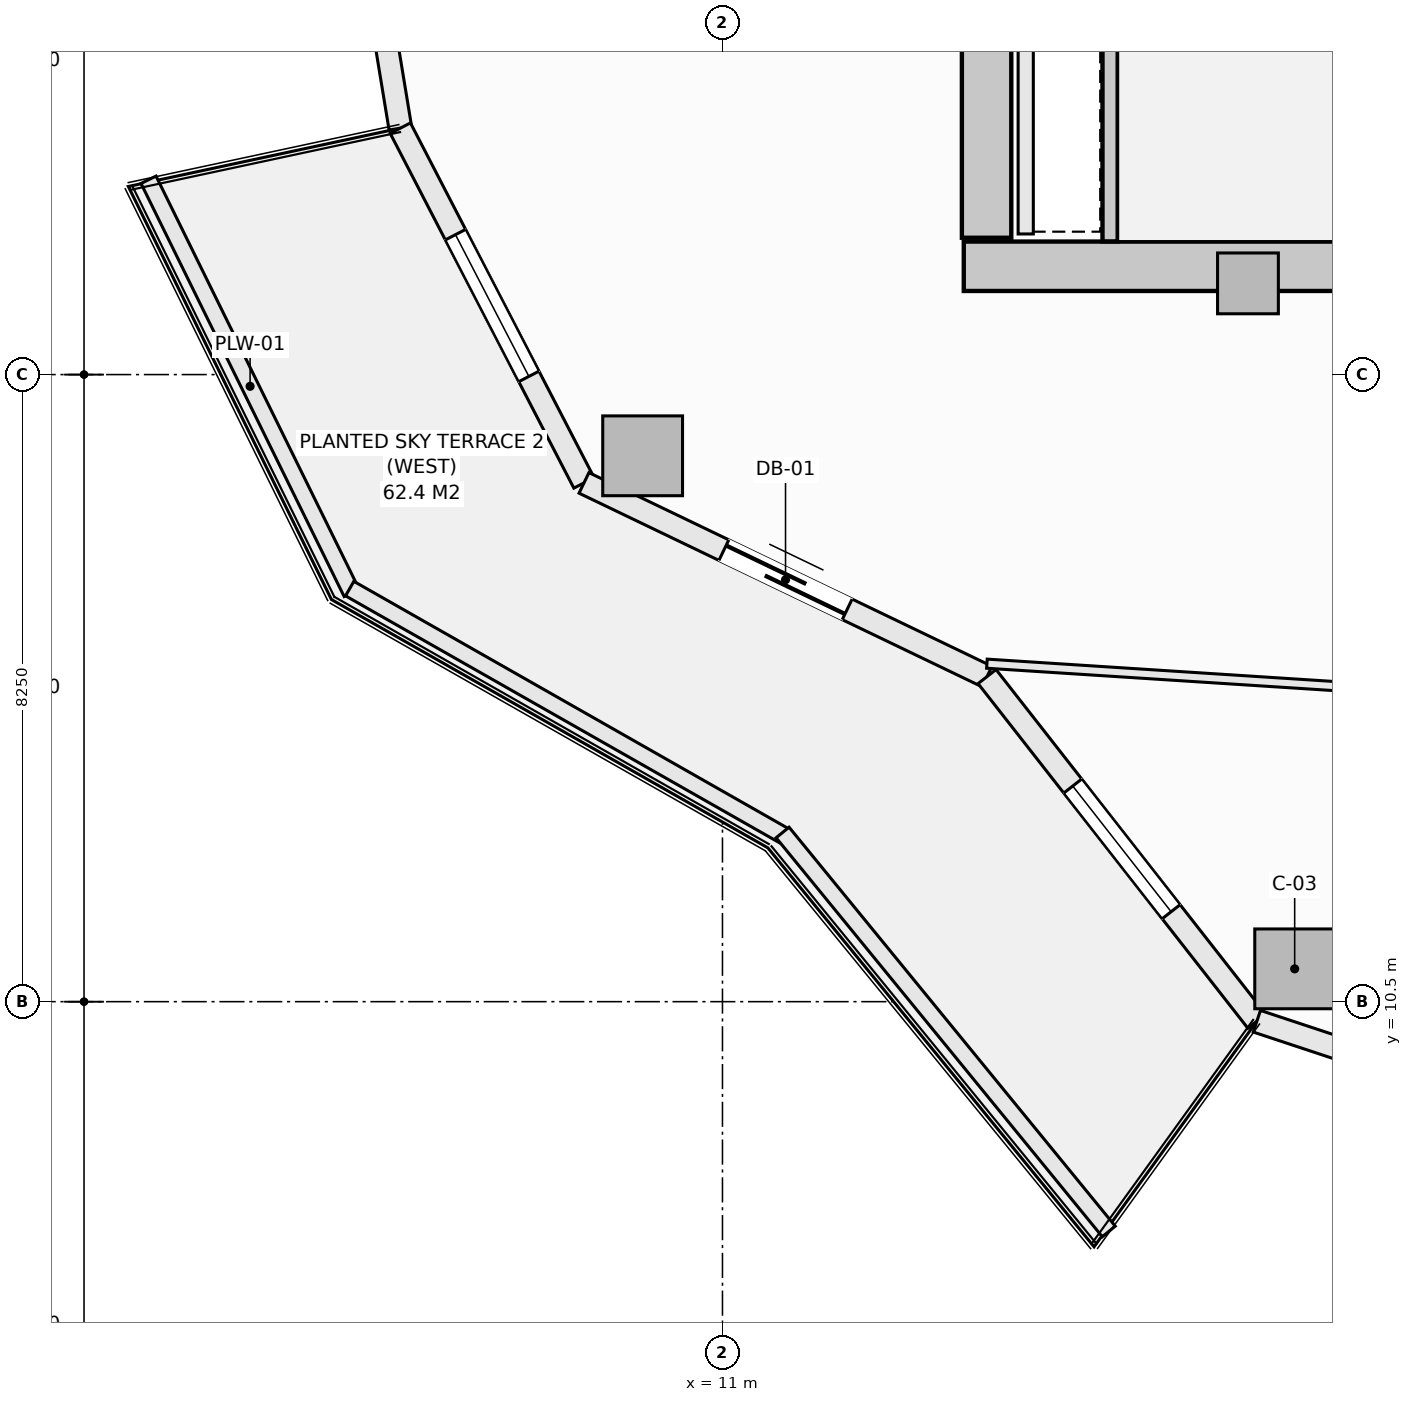
"""IFC4 building model, lengths in metres.
Left out: names, types, materials, properties, quantities, classifications, styles, units other than length and angle.
Written with IfcOpenShell. Run it as: python <this file> out.ifc"""

import sys

from ifc_helpers import new_model, si_unit, direction, frame, frame_2d, origin, origin_2d, place, context, subcontext, project, spatial, rectangle, extrude, element, fill, save


model = new_model("IFC4")
c1 = context("Model", 3, precision=1e-05, world=origin(), true_north=direction((0.0, 1.0)))
c2 = subcontext(c1, "Body", "Model", "MODEL_VIEW")
j1 = project(units=[si_unit("LENGTHUNIT", "METRE"), si_unit("PLANEANGLEUNIT", "RADIAN")], contexts=[c1])
p1 = place(None, origin())
s1 = spatial("IfcSite", under=j1, at=p1, CompositionType="ELEMENT")
p2 = place(p1, origin())
s2 = spatial("IfcBuilding", under=s1, at=p2, CompositionType="ELEMENT")
p3 = place(p2, frame((0.0, 0.0, 132.5)))
s3 = spatial("IfcBuildingStorey", under=s2, at=p3, CompositionType="ELEMENT", Elevation=132.5)
p4 = place(p3, frame((14.175, 20.175, -0.27), z_axis=(0.0, 0.0, 1.0), x_axis=(1.0, 0.0, 0.0)))
e1 = element("IfcWall", 1, at=p4, inside=s3, PredefinedType="SHEAR", context=c2, shape_type="SweptSolid", body=[
    extrude(rectangle(XDim=13.65, YDim=0.65, at=frame_2d((6.825, 0.0))), origin(), (0.0, 0.0, 1.0), 3.4),
])
p5 = place(p3, frame((14.475, 20.55, -0.27), z_axis=(0.0, 0.0, 1.0), x_axis=(0.0, 1.0, 0.0)))
e2 = element("IfcWall", 2, at=p5, inside=s3, PredefinedType="SHEAR", context=c2, shape_type="SweptSolid", body=[
    extrude(rectangle(XDim=12.9, YDim=0.65, at=frame_2d((6.45, 0.0))), origin(), (0.0, 0.0, 1.0), 3.4),
])
for number, where, z_axis, x_axis in (
    (3, (9.95, 17.681, -0.27), (0.0, 0.0, 1.0), (1.0, 0.0, 0.0)),
    (4, (18.529, 10.932, -0.27), (0.0, 0.0, 1.0), (1.0, 0.0, 0.0)),
):
    element("IfcColumn", number, at=place(p3, frame(where, z_axis=z_axis, x_axis=x_axis)), inside=s3, PredefinedType="COLUMN", context=c2, shape_type="SweptSolid", body=[
        extrude(rectangle(XDim=1.05, YDim=1.05, at=origin_2d()), origin(), (0.0, 0.0, 1.0), 3.4),
    ])
p6 = place(p3, frame((17.914, 19.95, -0.27), z_axis=(0.0, 0.0, 1.0), x_axis=(1.0, 0.0, 0.0)))
e5 = element("IfcColumn", 5, at=p6, inside=s3, PredefinedType="PILASTER", context=c2, shape_type="SweptSolid", body=[
    extrude(rectangle(XDim=0.8, YDim=0.8, at=origin_2d()), origin(), (0.0, 0.0, 1.0), 3.4),
])
p7 = place(p3, frame((5.938, 27.0, 0.0), z_axis=(0.0, 0.0, 1.0), x_axis=(0.162393944769, -0.986726003864, 0.0)))
e6 = element("IfcWall", 6, at=p7, inside=s3, PredefinedType="SOLIDWALL", context=c2, shape_type="SweptSolid", body=[
    extrude(rectangle(XDim=5.075, YDim=0.3, at=frame_2d((2.538, 0.0))), origin(), (0.0, 0.0, 1.0), 2.653),
])
p8 = place(p7, frame((1.488, 0.0, 0.74)))
e7 = element("IfcOpeningElement", 7, at=p8, cuts=e6, PredefinedType="OPENING", context=c2, shape_type="SweptSolid", body=[
    extrude(rectangle(XDim=2.1, YDim=1.7, at=frame_2d((1.05, 0.85))), frame((0.0, 0.16, 0.0), z_axis=(0.0, -1.0, 0.0), x_axis=(1.0, 0.0, 0.0)), (0.0, 0.0, 1.0), 0.32),
])
p9 = place(p3, frame((6.762, 21.992, 0.0), z_axis=(0.0, 0.0, 1.0), x_axis=(0.459767899643, -0.888039119892, 0.0)))
e8 = element("IfcWall", 8, at=p9, inside=s3, PredefinedType="SOLIDWALL", context=c2, shape_type="SweptSolid", body=[
    extrude(rectangle(XDim=5.255, YDim=0.3, at=frame_2d((2.628, 0.0))), origin(), (0.0, 0.0, 1.0), 2.653),
])
p10 = place(p9, frame((1.578, 0.0, 0.74)))
e9 = element("IfcOpeningElement", 9, at=p10, cuts=e8, PredefinedType="OPENING", context=c2, shape_type="SweptSolid", body=[
    extrude(rectangle(XDim=2.1, YDim=1.7, at=frame_2d((1.05, 0.85))), frame((0.0, 0.16, 0.0), z_axis=(0.0, -1.0, 0.0), x_axis=(1.0, 0.0, 0.0)), (0.0, 0.0, 1.0), 0.32),
])
p11 = place(p3, frame((9.178, 17.325, 0.0), z_axis=(0.0, 0.0, 1.0), x_axis=(0.901370184739, -0.433049408339, 0.0)))
e10 = element("IfcWall", 10, at=p11, inside=s3, PredefinedType="SOLIDWALL", context=c2, shape_type="SweptSolid", body=[
    extrude(rectangle(XDim=5.884, YDim=0.3, at=frame_2d((2.942, 0.0))), origin(), (0.0, 0.0, 1.0), 2.653),
])
p12 = place(p11, frame((2.042, 0.0, 0.0)))
e11 = element("IfcOpeningElement", 11, at=p12, cuts=e10, PredefinedType="OPENING", context=c2, shape_type="SweptSolid", body=[
    extrude(rectangle(XDim=1.8, YDim=2.25, at=frame_2d((0.9, 1.125))), frame((0.0, 0.16, 0.0), z_axis=(0.0, -1.0, 0.0), x_axis=(1.0, 0.0, 0.0)), (0.0, 0.0, 1.0), 0.32),
])
p13 = place(p3, frame((14.481, 14.777, 0.0), z_axis=(0.0, 0.0, 1.0), x_axis=(0.616435134162, -0.787405693001, 0.0)))
e12 = element("IfcWall", 12, at=p13, inside=s3, PredefinedType="SOLIDWALL", context=c2, shape_type="SweptSolid", body=[
    extrude(rectangle(XDim=5.759, YDim=0.3, at=frame_2d((2.879, 0.0))), origin(), (0.0, 0.0, 1.0), 2.653),
])
p14 = place(p13, frame((1.829, 0.0, 0.74)))
e13 = element("IfcOpeningElement", 13, at=p14, cuts=e12, PredefinedType="OPENING", context=c2, shape_type="SweptSolid", body=[
    extrude(rectangle(XDim=2.1, YDim=1.7, at=frame_2d((1.05, 0.85))), frame((0.0, 0.16, 0.0), z_axis=(0.0, -1.0, 0.0), x_axis=(1.0, 0.0, 0.0)), (0.0, 0.0, 1.0), 0.32),
])
p15 = place(p3, frame((18.031, 10.242, 0.0), z_axis=(0.0, 0.0, 1.0), x_axis=(0.949238009374, -0.314558741032, 0.0)))
e14 = element("IfcWall", 14, at=p15, inside=s3, PredefinedType="SOLIDWALL", context=c2, shape_type="SweptSolid", body=[
    extrude(rectangle(XDim=6.146, YDim=0.3, at=frame_2d((3.073, 0.0))), origin(), (0.0, 0.0, 1.0), 2.653),
])
p16 = place(p15, frame((1.83, 0.0, 0.74)))
e15 = element("IfcOpeningElement", 15, at=p16, cuts=e14, PredefinedType="OPENING", context=c2, shape_type="SweptSolid", body=[
    extrude(rectangle(XDim=1.2, YDim=1.7, at=frame_2d((0.6, 0.85))), frame((0.0, 0.16, 0.0), z_axis=(0.0, -1.0, 0.0), x_axis=(1.0, 0.0, 0.0)), (0.0, 0.0, 1.0), 0.32),
])
p17 = place(p15, frame((3.369, 0.0, 0.74)))
e16 = element("IfcOpeningElement", 16, at=p17, cuts=e14, PredefinedType="OPENING", context=c2, shape_type="SweptSolid", body=[
    extrude(rectangle(XDim=1.2, YDim=1.7, at=frame_2d((0.6, 0.85))), frame((0.0, 0.16, 0.0), z_axis=(0.0, -1.0, 0.0), x_axis=(1.0, 0.0, 0.0)), (0.0, 0.0, 1.0), 0.32),
])
p18 = place(p3, frame((3.449, 21.313, 0.0), z_axis=(0.0, 0.0, 1.0), x_axis=(0.441269631716, -0.897374566235, 0.0)))
e17 = element("IfcWall", 17, at=p18, inside=s3, PredefinedType="PARAPET", context=c2, shape_type="SweptSolid", body=[
    extrude(rectangle(XDim=6.056, YDim=0.22, at=frame_2d((3.028, 0.0))), origin(), (0.0, 0.0, 1.0), 0.52),
])
p19 = place(p3, frame((6.095, 15.934, 0.0), z_axis=(0.0, 0.0, 1.0), x_axis=(0.869187658335, -0.494482370361, 0.0)))
e18 = element("IfcWall", 18, at=p19, inside=s3, PredefinedType="PARAPET", context=c2, shape_type="SweptSolid", body=[
    extrude(rectangle(XDim=6.606, YDim=0.22, at=frame_2d((3.303, 0.0))), origin(), (0.0, 0.0, 1.0), 0.52),
])
p20 = place(p3, frame((11.791, 12.726, 0.0), z_axis=(0.0, 0.0, 1.0), x_axis=(0.633002467947, -0.77414977593, 0.0)))
e19 = element("IfcWall", 19, at=p20, inside=s3, PredefinedType="PARAPET", context=c2, shape_type="SweptSolid", body=[
    extrude(rectangle(XDim=6.78, YDim=0.22, at=frame_2d((3.39, 0.0))), origin(), (0.0, 0.0, 1.0), 0.52),
])
p21 = place(p3, frame((16.1, 20.502, -0.27), z_axis=(0.0, 0.0, 1.0), x_axis=(0.0, 1.0, 0.0)))
e20 = element("IfcWall", 20, at=p21, inside=s3, PredefinedType="SHEAR", context=c2, shape_type="SweptSolid", body=[
    extrude(rectangle(XDim=3.036, YDim=0.2, at=frame_2d((1.518, 0.0))), origin(), (0.0, 0.0, 1.0), 3.4),
])
p22 = place(p3, frame((14.99, 20.6, 0.0), z_axis=(0.0, 0.0, 1.0), x_axis=(0.0, 1.0, 0.0)))
e21 = element("IfcWall", 21, at=p22, inside=s3, PredefinedType="SOLIDWALL", context=c2, shape_type="SweptSolid", body=[
    extrude(rectangle(XDim=2.85, YDim=0.2, at=frame_2d((1.425, 0.0))), origin(), (0.0, 0.0, 1.0), 3.13),
])
p23 = place(p3, frame((14.479, 14.947, 0.0), z_axis=(0.0, 0.0, 1.0), x_axis=(0.997930277746, -0.064305215633, 0.0)))
e22 = element("IfcWall", 22, at=p23, inside=s3, PredefinedType="PARTITIONING", context=c2, shape_type="SweptSolid", body=[
    extrude(rectangle(XDim=12.62, YDim=0.12, at=frame_2d((6.31, 0.0))), origin(), (0.0, 0.0, 1.0), 2.812),
])
p24 = place(p10, origin())
e23 = element("IfcWindow", 23, at=p24, inside=s3, PartitioningType="SINGLE_PANEL", PredefinedType="WINDOW", context=c2, shape_type="SweptSolid", body=[
    extrude(rectangle(XDim=2.1, YDim=1.7, at=frame_2d((1.05, 0.85))), frame((0.0, 0.03, 0.0), z_axis=(0.0, -1.0, 0.0), x_axis=(1.0, 0.0, 0.0)), (0.0, 0.0, 1.0), 0.06),
])
fill(e9, e23)
p25 = place(p12, frame((1.8, 0.0, 0.0), z_axis=(0.0, 0.0, 1.0), x_axis=(-1.0, 0.0, 0.0)))
e24 = element("IfcDoor", 24, at=p25, inside=s3, OperationType="SLIDING_TO_LEFT", PredefinedType="DOOR", context=c2, shape_type="SweptSolid", body=[
    extrude(rectangle(XDim=1.8, YDim=2.25, at=frame_2d((0.9, 1.125))), frame((0.0, 0.025, 0.0), z_axis=(0.0, -1.0, 0.0), x_axis=(1.0, 0.0, 0.0)), (0.0, 0.0, 1.0), 0.05),
])
fill(e11, e24)
p26 = place(p14, origin())
e25 = element("IfcWindow", 25, at=p26, inside=s3, PartitioningType="SINGLE_PANEL", PredefinedType="WINDOW", context=c2, shape_type="SweptSolid", body=[
    extrude(rectangle(XDim=2.1, YDim=1.7, at=frame_2d((1.05, 0.85))), frame((0.0, 0.03, 0.0), z_axis=(0.0, -1.0, 0.0), x_axis=(1.0, 0.0, 0.0)), (0.0, 0.0, 1.0), 0.06),
])
fill(e13, e25)
save(model, sys.argv[1])
